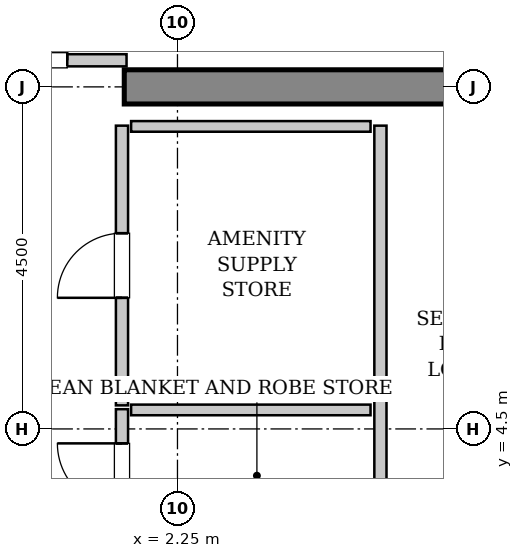
"""IFC4 building model, lengths in metres.
Left out: names, types, materials, properties, quantities, classifications, styles, units other than length and angle.
Written with IfcOpenShell. Run it as: python <this file> out.ifc"""

import sys

from ifc_helpers import new_model, si_unit, direction, frame, frame_2d, origin, place, context, subcontext, project, spatial, rectangle, extrude, source, transform, mapped, element, fill, save


model = new_model("IFC4")
c1 = context("Model", 3, precision=1e-05, world=origin(), true_north=direction((0.0, 1.0)))
c2 = subcontext(c1, "Body", "Model", "MODEL_VIEW")
j1 = project(units=[si_unit("LENGTHUNIT", "METRE"), si_unit("PLANEANGLEUNIT", "RADIAN")], contexts=[c1])
p1 = place(None, origin())
s1 = spatial("IfcSite", under=j1, at=p1, CompositionType="ELEMENT")
p2 = place(p1, origin())
s2 = spatial("IfcBuilding", under=s1, at=p2, CompositionType="ELEMENT")
p3 = place(p2, frame((0.0, 0.0, 314.0)))
s3 = spatial("IfcBuildingStorey", under=s2, at=p3, CompositionType="ELEMENT", Elevation=314.0)
m1 = source(origin(), c2, "Body", "SweptSolid", [
    extrude(rectangle(XDim=9.925, YDim=0.45, at=frame_2d((4.962, 0.0))), origin(), (0.0, 0.0, 1.0), 3.8),
])
p4 = place(p3, frame((1.55, 9.0, 0.0), z_axis=(0.0, 0.0, 1.0), x_axis=(1.0, 0.0, 0.0)))
e1 = element("IfcWall", 1, at=p4, inside=s3, PredefinedType="SHEAR", context=c2, shape_type="MappedRepresentation", body=[
    mapped(m1, transform((0.0, 0.0, 0.0), x_axis=(1.0, 0.0, 0.0), y_axis=(0.0, 1.0, 0.0), z_axis=(0.0, 0.0, 1.0), scale=1.0)),
])
m2 = source(origin(), c2, "Body", "SweptSolid", [
    extrude(rectangle(XDim=3.16, YDim=0.16, at=frame_2d((1.58, 0.0))), origin(), (0.0, 0.0, 1.0), 2.575),
])
p5 = place(p3, frame((-1.58, 9.35, 0.0), z_axis=(0.0, 0.0, 1.0), x_axis=(1.0, 0.0, 0.0)))
e2 = element("IfcWall", 2, at=p5, inside=s3, PredefinedType="PARTITIONING", context=c2, shape_type="MappedRepresentation", body=[
    mapped(m2, transform((0.0, 0.0, 0.0), x_axis=(1.0, 0.0, 0.0), y_axis=(0.0, 1.0, 0.0), z_axis=(0.0, 0.0, 1.0), scale=1.0)),
])
p6 = place(p5, frame((0.78, 0.0, 0.0)))
e3 = element("IfcOpeningElement", 3, at=p6, cuts=e2, PredefinedType="OPENING", context=c2, shape_type="SweptSolid", body=[
    extrude(rectangle(XDim=1.6, YDim=2.3, at=frame_2d((0.8, 1.15))), frame((0.0, 0.09, 0.0), z_axis=(0.0, -1.0, 0.0), x_axis=(1.0, 0.0, 0.0)), (0.0, 0.0, 1.0), 0.18),
])
m3 = source(origin(), c2, "Body", "SweptSolid", [
    extrude(rectangle(XDim=5.45, YDim=0.16, at=frame_2d((2.725, 0.0))), origin(), (0.0, 0.0, 1.0), 3.485),
])
p7 = place(p3, frame((4.92, 3.04, 0.0), z_axis=(0.0, 0.0, 1.0), x_axis=(0.0, 1.0, 0.0)))
e4 = element("IfcWall", 4, at=p7, inside=s3, PredefinedType="PARTITIONING", context=c2, shape_type="MappedRepresentation", body=[
    mapped(m3, transform((0.0, 0.0, 0.0), x_axis=(1.0, 0.0, 0.0), y_axis=(0.0, 1.0, 0.0), z_axis=(0.0, 0.0, 1.0), scale=1.0)),
])
m4 = source(origin(), c2, "Body", "SweptSolid", [
    extrude(rectangle(XDim=1.75, YDim=0.16, at=frame_2d((0.875, 0.0))), origin(), (0.0, 0.0, 1.0), 3.485),
])
p8 = place(p3, frame((1.52, 3.01, 0.0), z_axis=(0.0, 0.0, 1.0), x_axis=(0.0, 1.0, 0.0)))
e5 = element("IfcWall", 5, at=p8, inside=s3, PredefinedType="PARTITIONING", context=c2, shape_type="MappedRepresentation", body=[
    mapped(m4, transform((0.0, 0.0, 0.0), x_axis=(1.0, 0.0, 0.0), y_axis=(0.0, 1.0, 0.0), z_axis=(0.0, 0.0, 1.0), scale=1.0)),
])
p9 = place(p8, frame((0.45, 0.0, 0.0)))
e6 = element("IfcOpeningElement", 6, at=p9, cuts=e5, PredefinedType="OPENING", context=c2, shape_type="SweptSolid", body=[
    extrude(rectangle(XDim=0.85, YDim=2.1, at=frame_2d((0.425, 1.05))), frame((0.0, 0.09, 0.0), z_axis=(0.0, -1.0, 0.0), x_axis=(1.0, 0.0, 0.0)), (0.0, 0.0, 1.0), 0.18),
])
m5 = source(origin(), c2, "Body", "SweptSolid", [
    extrude(rectangle(XDim=3.15, YDim=0.14, at=frame_2d((1.575, 0.0))), origin(), (0.0, 0.0, 1.0), 3.485),
])
p10 = place(p3, frame((1.64, 4.75, 0.0), z_axis=(0.0, 0.0, 1.0), x_axis=(1.0, 0.0, 0.0)))
e7 = element("IfcWall", 7, at=p10, inside=s3, PredefinedType="PARTITIONING", context=c2, shape_type="MappedRepresentation", body=[
    mapped(m5, transform((0.0, 0.0, 0.0), x_axis=(1.0, 0.0, 0.0), y_axis=(0.0, 1.0, 0.0), z_axis=(0.0, 0.0, 1.0), scale=1.0)),
])
m6 = source(origin(), c2, "Body", "SweptSolid", [
    extrude(rectangle(XDim=3.68, YDim=0.16, at=frame_2d((1.84, 0.0))), origin(), (0.0, 0.0, 1.0), 3.485),
])
p11 = place(p3, frame((1.52, 4.81, 0.0), z_axis=(0.0, 0.0, 1.0), x_axis=(0.0, 1.0, 0.0)))
e8 = element("IfcWall", 8, at=p11, inside=s3, PredefinedType="PARTITIONING", context=c2, shape_type="MappedRepresentation", body=[
    mapped(m6, transform((0.0, 0.0, 0.0), x_axis=(1.0, 0.0, 0.0), y_axis=(0.0, 1.0, 0.0), z_axis=(0.0, 0.0, 1.0), scale=1.0)),
])
p12 = place(p11, frame((1.415, 0.0, 0.0)))
e9 = element("IfcOpeningElement", 9, at=p12, cuts=e8, PredefinedType="OPENING", context=c2, shape_type="SweptSolid", body=[
    extrude(rectangle(XDim=0.85, YDim=2.1, at=frame_2d((0.425, 1.05))), frame((0.0, 0.09, 0.0), z_axis=(0.0, -1.0, 0.0), x_axis=(1.0, 0.0, 0.0)), (0.0, 0.0, 1.0), 0.18),
])
p13 = place(p3, frame((1.64, 8.48, 0.0), z_axis=(0.0, 0.0, 1.0), x_axis=(1.0, 0.0, 0.0)))
e10 = element("IfcWall", 10, at=p13, inside=s3, PredefinedType="PARTITIONING", context=c2, shape_type="MappedRepresentation", body=[
    mapped(m5, transform((0.0, 0.0, 0.0), x_axis=(1.0, 0.0, 0.0), y_axis=(0.0, 1.0, 0.0), z_axis=(0.0, 0.0, 1.0), scale=1.0)),
])
m7 = source(origin(), c2, "Body", "SweptSolid", [
    extrude(rectangle(XDim=1.6, YDim=2.3, at=frame_2d((0.8, 1.15))), frame((0.0, 0.025, 0.0), z_axis=(0.0, -1.0, 0.0), x_axis=(1.0, 0.0, 0.0)), (0.0, 0.0, 1.0), 0.05),
])
p14 = place(p6, origin())
e11 = element("IfcDoor", 11, at=p14, inside=s3, OperationType="DOUBLE_DOOR_SINGLE_SWING", PredefinedType="DOOR", context=c2, shape_type="MappedRepresentation", body=[
    mapped(m7, transform((0.0, 0.0, 0.0), x_axis=(1.0, 0.0, 0.0), y_axis=(0.0, 1.0, 0.0), z_axis=(0.0, 0.0, 1.0), scale=1.0)),
])
fill(e3, e11)
m8 = source(origin(), c2, "Body", "SweptSolid", [
    extrude(rectangle(XDim=0.85, YDim=2.1, at=frame_2d((0.425, 1.05))), frame((0.0, 0.025, 0.0), z_axis=(0.0, -1.0, 0.0), x_axis=(1.0, 0.0, 0.0)), (0.0, 0.0, 1.0), 0.05),
])
p15 = place(p9, origin())
e12 = element("IfcDoor", 12, at=p15, inside=s3, OperationType="SINGLE_SWING_RIGHT", PredefinedType="DOOR", context=c2, shape_type="MappedRepresentation", body=[
    mapped(m8, transform((0.0, 0.0, 0.0), x_axis=(1.0, 0.0, 0.0), y_axis=(0.0, 1.0, 0.0), z_axis=(0.0, 0.0, 1.0), scale=1.0)),
])
fill(e6, e12)
p16 = place(p12, origin())
e13 = element("IfcDoor", 13, at=p16, inside=s3, OperationType="SINGLE_SWING_LEFT", PredefinedType="DOOR", context=c2, shape_type="MappedRepresentation", body=[
    mapped(m8, transform((0.0, 0.0, 0.0), x_axis=(1.0, 0.0, 0.0), y_axis=(0.0, 1.0, 0.0), z_axis=(0.0, 0.0, 1.0), scale=1.0)),
])
fill(e9, e13)
save(model, sys.argv[1])
